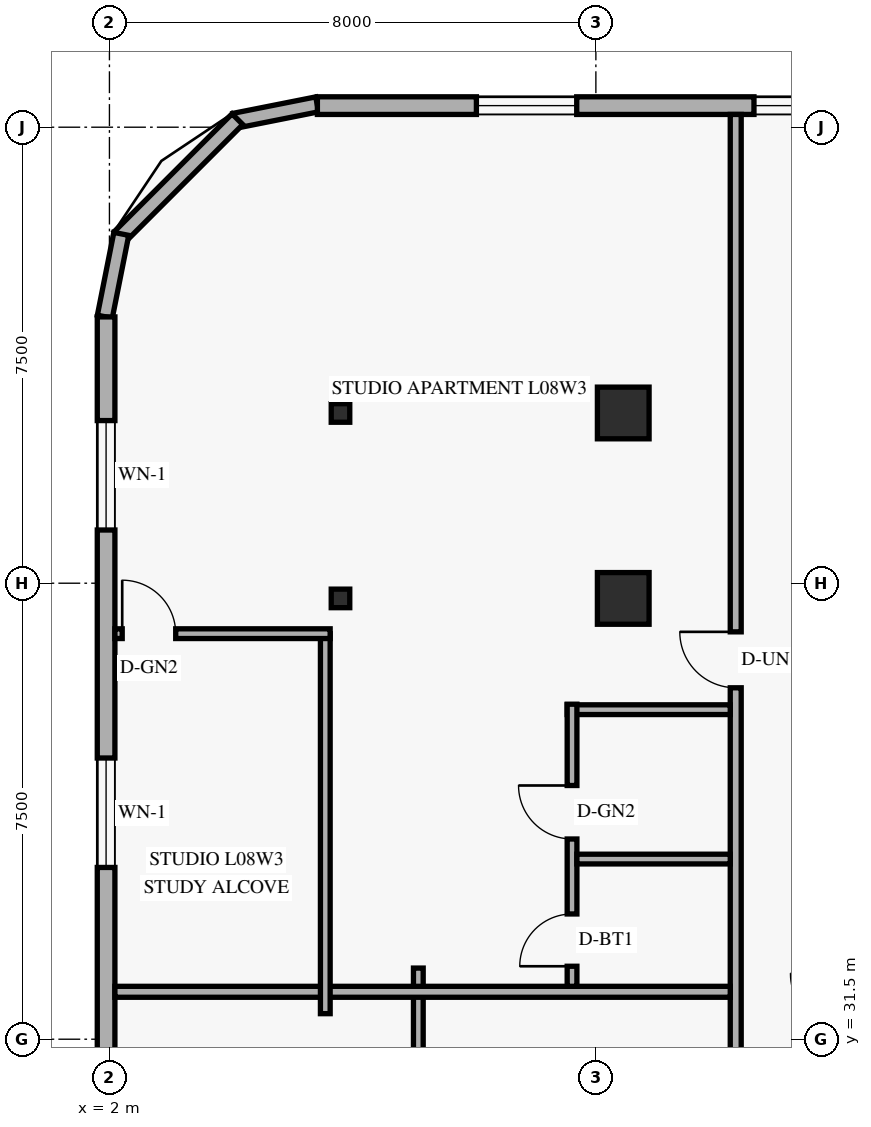
"""IFC4 building model, lengths in metres.
Left out: names, types, materials, properties, quantities, classifications, styles, units other than length and angle.
Written with IfcOpenShell. Run it as: python <this file> out.ifc"""

import sys

from ifc_helpers import new_model, si_unit, direction, frame, frame_2d, origin, origin_2d, place, context, subcontext, project, spatial, rectangle, hollow_rectangle, extrude, element, fill, save


model = new_model("IFC4")
c1 = context("Model", 3, precision=1e-05, world=origin(), true_north=direction((0.0, 1.0)))
c2 = subcontext(c1, "Body", "Model", "MODEL_VIEW")
j1 = project(units=[si_unit("LENGTHUNIT", "METRE"), si_unit("PLANEANGLEUNIT", "RADIAN")], contexts=[c1])
p1 = place(None, origin())
s1 = spatial("IfcSite", under=j1, at=p1, CompositionType="ELEMENT")
p2 = place(p1, origin())
s2 = spatial("IfcBuilding", under=s1, at=p2, CompositionType="ELEMENT")
p3 = place(p2, frame((0.0, 0.0, 34.8)))
s3 = spatial("IfcBuildingStorey", under=s2, at=p3, CompositionType="ELEMENT", Elevation=34.8)
for number, where, z_axis, x_axis in (
    (1, (5.8, 38.75, 0.0), (0.0, 0.0, 1.0), (1.0, 0.0, 0.0)),
    (2, (5.8, 41.8, 0.0), (0.0, 0.0, 1.0), (1.0, 0.0, 0.0)),
):
    element("IfcColumn", number, at=place(p3, frame(where, z_axis=z_axis, x_axis=x_axis)), inside=s3, PredefinedType="COLUMN", context=c2, shape_type="SweptSolid", body=[
        extrude(hollow_rectangle(XDim=0.305, YDim=0.305, WallThickness=0.013, at=origin_2d()), origin(), (0.0, 0.0, 1.0), 3.6),
    ])
for number, where, z_axis, x_axis in (
    (3, (10.45, 38.75, 0.0), (0.0, 0.0, 1.0), (1.0, 0.0, 0.0)),
    (4, (10.45, 41.8, 0.0), (0.0, 0.0, 1.0), (1.0, 0.0, 0.0)),
):
    element("IfcColumn", number, at=place(p3, frame(where, z_axis=z_axis, x_axis=x_axis)), inside=s3, PredefinedType="COLUMN", context=c2, shape_type="SweptSolid", body=[
        extrude(rectangle(XDim=0.85, YDim=0.85, at=origin_2d()), origin(), (0.0, 0.0, 1.0), 3.6),
    ])
p4 = place(p3, frame((5.417, 46.876, 0.0), z_axis=(0.0, 0.0, 1.0), x_axis=(-0.980809899341, -0.19496651342, 0.0)))
e5 = element("IfcWall", 5, at=p4, inside=s3, PredefinedType="SOLIDWALL", context=c2, shape_type="SweptSolid", body=[
    extrude(rectangle(XDim=1.389, YDim=0.25, at=frame_2d((0.694, 0.0))), origin(), (0.0, 0.0, 1.0), 3.36),
])
p5 = place(p3, frame((4.105, 46.632, 0.0), z_axis=(0.0, 0.0, 1.0), x_axis=(-0.707106781187, -0.707106781187, 0.0)))
e6 = element("IfcWall", 6, at=p5, inside=s3, PredefinedType="SOLIDWALL", context=c2, shape_type="SweptSolid", body=[
    extrude(rectangle(XDim=2.739, YDim=0.25, at=frame_2d((1.37, 0.0))), origin(), (0.0, 0.0, 1.0), 3.36),
])
p6 = place(p3, frame((2.195, 44.746, 0.0), z_axis=(0.0, 0.0, 1.0), x_axis=(-0.19496651342, -0.980809899341, 0.0)))
e7 = element("IfcWall", 7, at=p6, inside=s3, PredefinedType="SOLIDWALL", context=c2, shape_type="SweptSolid", body=[
    extrude(rectangle(XDim=1.389, YDim=0.25, at=frame_2d((0.694, 0.0))), origin(), (0.0, 0.0, 1.0), 3.36),
])
p7 = place(p3, frame((44.98, 46.855, 0.0), z_axis=(0.0, 0.0, 1.0), x_axis=(-1.0, 0.0, 0.0)))
e8 = element("IfcWall", 8, at=p7, inside=s3, PredefinedType="SOLIDWALL", context=c2, shape_type="SweptSolid", body=[
    extrude(rectangle(XDim=39.56, YDim=0.29, at=frame_2d((19.78, 0.0))), origin(), (0.0, 0.0, 1.0), 3.36),
])
p8 = place(p7, frame((35.295, 0.0, 0.85)))
e9 = element("IfcOpeningElement", 9, at=p8, cuts=e8, PredefinedType="OPENING", context=c2, shape_type="SweptSolid", body=[
    extrude(rectangle(XDim=1.65, YDim=1.6, at=frame_2d((0.825, 0.8))), frame((0.0, 0.155, 0.0), z_axis=(0.0, -1.0, 0.0), x_axis=(1.0, 0.0, 0.0)), (0.0, 0.0, 1.0), 0.31),
])
p9 = place(p7, frame((31.18, 0.0, 0.85)))
e10 = element("IfcOpeningElement", 10, at=p9, cuts=e8, PredefinedType="OPENING", context=c2, shape_type="SweptSolid", body=[
    extrude(rectangle(XDim=1.2, YDim=1.5, at=frame_2d((0.6, 0.75))), frame((0.0, 0.155, 0.0), z_axis=(0.0, -1.0, 0.0), x_axis=(1.0, 0.0, 0.0)), (0.0, 0.0, 1.0), 0.31),
])
p10 = place(p7, frame((25.684, 0.0, 0.85)))
e11 = element("IfcOpeningElement", 11, at=p10, cuts=e8, PredefinedType="OPENING", context=c2, shape_type="SweptSolid", body=[
    extrude(rectangle(XDim=1.65, YDim=1.6, at=frame_2d((0.825, 0.8))), frame((0.0, 0.155, 0.0), z_axis=(0.0, -1.0, 0.0), x_axis=(1.0, 0.0, 0.0)), (0.0, 0.0, 1.0), 0.31),
])
p11 = place(p7, frame((18.649, 0.0, 0.85)))
e12 = element("IfcOpeningElement", 12, at=p11, cuts=e8, PredefinedType="OPENING", context=c2, shape_type="SweptSolid", body=[
    extrude(rectangle(XDim=1.65, YDim=1.6, at=frame_2d((0.825, 0.8))), frame((0.0, 0.155, 0.0), z_axis=(0.0, -1.0, 0.0), x_axis=(1.0, 0.0, 0.0)), (0.0, 0.0, 1.0), 0.31),
])
p12 = place(p7, frame((12.359, 0.0, 0.85)))
e13 = element("IfcOpeningElement", 13, at=p12, cuts=e8, PredefinedType="OPENING", context=c2, shape_type="SweptSolid", body=[
    extrude(rectangle(XDim=1.65, YDim=1.6, at=frame_2d((0.825, 0.8))), frame((0.0, 0.155, 0.0), z_axis=(0.0, -1.0, 0.0), x_axis=(1.0, 0.0, 0.0)), (0.0, 0.0, 1.0), 0.31),
])
p13 = place(p7, frame((7.895, 0.0, 0.85)))
e14 = element("IfcOpeningElement", 14, at=p13, cuts=e8, PredefinedType="OPENING", context=c2, shape_type="SweptSolid", body=[
    extrude(rectangle(XDim=1.2, YDim=1.5, at=frame_2d((0.6, 0.75))), frame((0.0, 0.155, 0.0), z_axis=(0.0, -1.0, 0.0), x_axis=(1.0, 0.0, 0.0)), (0.0, 0.0, 1.0), 0.31),
])
p14 = place(p7, frame((5.183, 0.0, 0.85)))
e15 = element("IfcOpeningElement", 15, at=p14, cuts=e8, PredefinedType="OPENING", context=c2, shape_type="SweptSolid", body=[
    extrude(rectangle(XDim=1.65, YDim=1.6, at=frame_2d((0.825, 0.8))), frame((0.0, 0.155, 0.0), z_axis=(0.0, -1.0, 0.0), x_axis=(1.0, 0.0, 0.0)), (0.0, 0.0, 1.0), 0.31),
])
p15 = place(p7, frame((1.468, 0.0, 0.85)))
e16 = element("IfcOpeningElement", 16, at=p15, cuts=e8, PredefinedType="OPENING", context=c2, shape_type="SweptSolid", body=[
    extrude(rectangle(XDim=1.65, YDim=1.6, at=frame_2d((0.825, 0.8))), frame((0.0, 0.155, 0.0), z_axis=(0.0, -1.0, 0.0), x_axis=(1.0, 0.0, 0.0)), (0.0, 0.0, 1.0), 0.31),
])
p16 = place(p3, frame((1.945, 43.38, 0.0), z_axis=(0.0, 0.0, 1.0), x_axis=(0.0, -1.0, 0.0)))
e17 = element("IfcWall", 17, at=p16, inside=s3, PredefinedType="SOLIDWALL", context=c2, shape_type="SweptSolid", body=[
    extrude(rectangle(XDim=38.76, YDim=0.29, at=frame_2d((19.38, 0.0))), origin(), (0.0, 0.0, 1.0), 3.36),
])
p17 = place(p16, frame((33.9, 0.0, 0.85)))
e18 = element("IfcOpeningElement", 18, at=p17, cuts=e17, PredefinedType="OPENING", context=c2, shape_type="SweptSolid", body=[
    extrude(rectangle(XDim=1.8, YDim=1.6, at=frame_2d((0.9, 0.8))), frame((0.0, 0.155, 0.0), z_axis=(0.0, -1.0, 0.0), x_axis=(1.0, 0.0, 0.0)), (0.0, 0.0, 1.0), 0.31),
])
p18 = place(p16, frame((27.89, 0.0, 0.85)))
e19 = element("IfcOpeningElement", 19, at=p18, cuts=e17, PredefinedType="OPENING", context=c2, shape_type="SweptSolid", body=[
    extrude(rectangle(XDim=1.8, YDim=1.6, at=frame_2d((0.9, 0.8))), frame((0.0, 0.155, 0.0), z_axis=(0.0, -1.0, 0.0), x_axis=(1.0, 0.0, 0.0)), (0.0, 0.0, 1.0), 0.31),
])
p19 = place(p16, frame((23.859, 0.0, 0.85)))
e20 = element("IfcOpeningElement", 20, at=p19, cuts=e17, PredefinedType="OPENING", context=c2, shape_type="SweptSolid", body=[
    extrude(rectangle(XDim=1.8, YDim=1.6, at=frame_2d((0.9, 0.8))), frame((0.0, 0.155, 0.0), z_axis=(0.0, -1.0, 0.0), x_axis=(1.0, 0.0, 0.0)), (0.0, 0.0, 1.0), 0.31),
])
p20 = place(p16, frame((18.034, 0.0, 0.85)))
e21 = element("IfcOpeningElement", 21, at=p20, cuts=e17, PredefinedType="OPENING", context=c2, shape_type="SweptSolid", body=[
    extrude(rectangle(XDim=1.8, YDim=1.6, at=frame_2d((0.9, 0.8))), frame((0.0, 0.155, 0.0), z_axis=(0.0, -1.0, 0.0), x_axis=(1.0, 0.0, 0.0)), (0.0, 0.0, 1.0), 0.31),
])
p21 = place(p16, frame((12.195, 0.0, 0.85)))
e22 = element("IfcOpeningElement", 22, at=p21, cuts=e17, PredefinedType="OPENING", context=c2, shape_type="SweptSolid", body=[
    extrude(rectangle(XDim=1.8, YDim=1.6, at=frame_2d((0.9, 0.8))), frame((0.0, 0.155, 0.0), z_axis=(0.0, -1.0, 0.0), x_axis=(1.0, 0.0, 0.0)), (0.0, 0.0, 1.0), 0.31),
])
p22 = place(p16, frame((7.255, 0.0, 0.85)))
e23 = element("IfcOpeningElement", 23, at=p22, cuts=e17, PredefinedType="OPENING", context=c2, shape_type="SweptSolid", body=[
    extrude(rectangle(XDim=1.8, YDim=1.6, at=frame_2d((0.9, 0.8))), frame((0.0, 0.155, 0.0), z_axis=(0.0, -1.0, 0.0), x_axis=(1.0, 0.0, 0.0)), (0.0, 0.0, 1.0), 0.31),
])
p23 = place(p16, frame((1.705, 0.0, 0.85)))
e24 = element("IfcOpeningElement", 24, at=p23, cuts=e17, PredefinedType="OPENING", context=c2, shape_type="SweptSolid", body=[
    extrude(rectangle(XDim=1.8, YDim=1.6, at=frame_2d((0.9, 0.8))), frame((0.0, 0.155, 0.0), z_axis=(0.0, -1.0, 0.0), x_axis=(1.0, 0.0, 0.0)), (0.0, 0.0, 1.0), 0.31),
])
p24 = place(p3, frame((12.3, 1.29, 0.0), z_axis=(0.0, 0.0, 1.0), x_axis=(0.0, 1.0, 0.0)))
e25 = element("IfcWall", 25, at=p24, inside=s3, PredefinedType="STANDARD", context=c2, shape_type="SweptSolid", body=[
    extrude(rectangle(XDim=45.42, YDim=0.18, at=frame_2d((22.71, 0.0))), origin(), (0.0, 0.0, 1.0), 2.649),
])
p25 = place(p24, frame((8.06, 0.0, 0.0)))
e26 = element("IfcOpeningElement", 26, at=p25, cuts=e25, PredefinedType="OPENING", context=c2, shape_type="SweptSolid", body=[
    extrude(rectangle(XDim=0.92, YDim=2.15, at=frame_2d((0.46, 1.075))), frame((0.0, 0.1, 0.0), z_axis=(0.0, -1.0, 0.0), x_axis=(1.0, 0.0, 0.0)), (0.0, 0.0, 1.0), 0.2),
])
p26 = place(p24, frame((21.021, 0.0, 0.0)))
e27 = element("IfcOpeningElement", 27, at=p26, cuts=e25, PredefinedType="OPENING", context=c2, shape_type="SweptSolid", body=[
    extrude(rectangle(XDim=0.92, YDim=2.15, at=frame_2d((0.46, 1.075))), frame((0.0, 0.1, 0.0), z_axis=(0.0, -1.0, 0.0), x_axis=(1.0, 0.0, 0.0)), (0.0, 0.0, 1.0), 0.2),
])
p27 = place(p24, frame((35.99, 0.0, 0.0)))
e28 = element("IfcOpeningElement", 28, at=p27, cuts=e25, PredefinedType="OPENING", context=c2, shape_type="SweptSolid", body=[
    extrude(rectangle(XDim=0.92, YDim=2.15, at=frame_2d((0.46, 1.075))), frame((0.0, 0.1, 0.0), z_axis=(0.0, -1.0, 0.0), x_axis=(1.0, 0.0, 0.0)), (0.0, 0.0, 1.0), 0.2),
])
p28 = place(p3, frame((7.08, 28.21, 0.0), z_axis=(0.0, 0.0, 1.0), x_axis=(0.0, 1.0, 0.0)))
e29 = element("IfcWall", 29, at=p28, inside=s3, PredefinedType="PARTITIONING", context=c2, shape_type="SweptSolid", body=[
    extrude(rectangle(XDim=4.46, YDim=0.16, at=frame_2d((2.23, 0.0))), origin(), (0.0, 0.0, 1.0), 2.649),
])
p29 = place(p3, frame((2.09, 32.28, 0.0), z_axis=(0.0, 0.0, 1.0), x_axis=(1.0, 0.0, 0.0)))
e30 = element("IfcWall", 30, at=p29, inside=s3, PredefinedType="PARTITIONING", context=c2, shape_type="SweptSolid", body=[
    extrude(rectangle(XDim=10.12, YDim=0.18, at=frame_2d((5.06, 0.0))), origin(), (0.0, 0.0, 1.0), 2.649),
])
p30 = place(p3, frame((9.528, 36.92, 0.0), z_axis=(0.0, 0.0, 1.0), x_axis=(1.0, 0.0, 0.0)))
e31 = element("IfcWall", 31, at=p30, inside=s3, PredefinedType="PLUMBINGWALL", context=c2, shape_type="SweptSolid", body=[
    extrude(rectangle(XDim=2.682, YDim=0.16, at=frame_2d((1.341, 0.0))), origin(), (0.0, 0.0, 1.0), 2.649),
])
p31 = place(p3, frame((9.608, 32.37, 0.0), z_axis=(0.0, 0.0, 1.0), x_axis=(0.0, 1.0, 0.0)))
e32 = element("IfcWall", 32, at=p31, inside=s3, PredefinedType="PLUMBINGWALL", context=c2, shape_type="SweptSolid", body=[
    extrude(rectangle(XDim=4.64, YDim=0.16, at=frame_2d((2.32, 0.0))), origin(), (0.0, 0.0, 1.0), 2.932),
])
p32 = place(p31, frame((0.33, 0.0, 0.0)))
e33 = element("IfcOpeningElement", 33, at=p32, cuts=e32, PredefinedType="OPENING", context=c2, shape_type="SweptSolid", body=[
    extrude(rectangle(XDim=0.86, YDim=2.12, at=frame_2d((0.43, 1.06))), frame((0.0, 0.09, 0.0), z_axis=(0.0, -1.0, 0.0), x_axis=(1.0, 0.0, 0.0)), (0.0, 0.0, 1.0), 0.18),
])
p33 = place(p31, frame((2.423, 0.0, 0.0)))
e34 = element("IfcOpeningElement", 34, at=p33, cuts=e32, PredefinedType="OPENING", context=c2, shape_type="SweptSolid", body=[
    extrude(rectangle(XDim=0.88, YDim=2.12, at=frame_2d((0.44, 1.06))), frame((0.0, 0.09, 0.0), z_axis=(0.0, -1.0, 0.0), x_axis=(1.0, 0.0, 0.0)), (0.0, 0.0, 1.0), 0.18),
])
p34 = place(p3, frame((9.688, 34.463, 0.0), z_axis=(0.0, 0.0, 1.0), x_axis=(1.0, 0.0, 0.0)))
e35 = element("IfcWall", 35, at=p34, inside=s3, PredefinedType="PLUMBINGWALL", context=c2, shape_type="SweptSolid", body=[
    extrude(rectangle(XDim=2.522, YDim=0.16, at=frame_2d((1.261, 0.0))), origin(), (0.0, 0.0, 1.0), 2.649),
])
p35 = place(p3, frame((5.55, 31.92, 0.0), z_axis=(0.0, 0.0, 1.0), x_axis=(0.0, 1.0, 0.0)))
e36 = element("IfcWall", 36, at=p35, inside=s3, PredefinedType="PARTITIONING", context=c2, shape_type="SweptSolid", body=[
    extrude(rectangle(XDim=6.25, YDim=0.16, at=frame_2d((3.125, 0.0))), origin(), (0.0, 0.0, 1.0), 3.36),
])
p36 = place(p3, frame((2.09, 38.17, 0.0), z_axis=(0.0, 0.0, 1.0), x_axis=(1.0, 0.0, 0.0)))
e37 = element("IfcWall", 37, at=p36, inside=s3, PredefinedType="PARTITIONING", context=c2, shape_type="SweptSolid", body=[
    extrude(rectangle(XDim=3.54, YDim=0.16, at=frame_2d((1.77, 0.0))), origin(), (0.0, 0.0, 1.0), 3.36),
])
p37 = place(p36, frame((0.12, 0.0, 0.0)))
e38 = element("IfcOpeningElement", 38, at=p37, cuts=e37, PredefinedType="OPENING", context=c2, shape_type="SweptSolid", body=[
    extrude(rectangle(XDim=0.88, YDim=2.12, at=frame_2d((0.44, 1.06))), frame((0.0, 0.09, 0.0), z_axis=(0.0, -1.0, 0.0), x_axis=(1.0, 0.0, 0.0)), (0.0, 0.0, 1.0), 0.18),
])
p38 = place(p8, origin())
e39 = element("IfcWindow", 39, at=p38, inside=s3, PartitioningType="SINGLE_PANEL", PredefinedType="WINDOW", context=c2, shape_type="SweptSolid", body=[
    extrude(rectangle(XDim=1.65, YDim=1.6, at=frame_2d((0.825, 0.8))), frame((0.0, 0.03, 0.0), z_axis=(0.0, -1.0, 0.0), x_axis=(1.0, 0.0, 0.0)), (0.0, 0.0, 1.0), 0.06),
])
fill(e9, e39)
p39 = place(p9, origin())
e40 = element("IfcWindow", 40, at=p39, inside=s3, PartitioningType="SINGLE_PANEL", PredefinedType="WINDOW", context=c2, shape_type="SweptSolid", body=[
    extrude(rectangle(XDim=1.2, YDim=1.5, at=frame_2d((0.6, 0.75))), frame((0.0, 0.03, 0.0), z_axis=(0.0, -1.0, 0.0), x_axis=(1.0, 0.0, 0.0)), (0.0, 0.0, 1.0), 0.06),
])
fill(e10, e40)
p40 = place(p22, origin())
e41 = element("IfcWindow", 41, at=p40, inside=s3, PartitioningType="SINGLE_PANEL", PredefinedType="WINDOW", context=c2, shape_type="SweptSolid", body=[
    extrude(rectangle(XDim=1.8, YDim=1.6, at=frame_2d((0.9, 0.8))), frame((0.0, 0.03, 0.0), z_axis=(0.0, -1.0, 0.0), x_axis=(1.0, 0.0, 0.0)), (0.0, 0.0, 1.0), 0.06),
])
fill(e23, e41)
p41 = place(p23, origin())
e42 = element("IfcWindow", 42, at=p41, inside=s3, PartitioningType="SINGLE_PANEL", PredefinedType="WINDOW", context=c2, shape_type="SweptSolid", body=[
    extrude(rectangle(XDim=1.8, YDim=1.6, at=frame_2d((0.9, 0.8))), frame((0.0, 0.03, 0.0), z_axis=(0.0, -1.0, 0.0), x_axis=(1.0, 0.0, 0.0)), (0.0, 0.0, 1.0), 0.06),
])
fill(e24, e42)
p42 = place(p37, origin())
e43 = element("IfcDoor", 43, at=p42, inside=s3, OperationType="SINGLE_SWING_LEFT", PredefinedType="DOOR", context=c2, shape_type="SweptSolid", body=[
    extrude(rectangle(XDim=0.88, YDim=2.12, at=frame_2d((0.44, 1.06))), frame((0.0, 0.025, 0.0), z_axis=(0.0, -1.0, 0.0), x_axis=(1.0, 0.0, 0.0)), (0.0, 0.0, 1.0), 0.05),
])
fill(e38, e43)
p43 = place(p27, origin())
e44 = element("IfcDoor", 44, at=p43, inside=s3, OperationType="SINGLE_SWING_RIGHT", PredefinedType="DOOR", context=c2, shape_type="SweptSolid", body=[
    extrude(rectangle(XDim=0.92, YDim=2.15, at=frame_2d((0.46, 1.075))), frame((0.0, 0.025, 0.0), z_axis=(0.0, -1.0, 0.0), x_axis=(1.0, 0.0, 0.0)), (0.0, 0.0, 1.0), 0.05),
])
fill(e28, e44)
p44 = place(p32, origin())
e45 = element("IfcDoor", 45, at=p44, inside=s3, OperationType="SINGLE_SWING_LEFT", PredefinedType="DOOR", context=c2, shape_type="SweptSolid", body=[
    extrude(rectangle(XDim=0.86, YDim=2.12, at=frame_2d((0.43, 1.06))), frame((0.0, 0.025, 0.0), z_axis=(0.0, -1.0, 0.0), x_axis=(1.0, 0.0, 0.0)), (0.0, 0.0, 1.0), 0.05),
])
fill(e33, e45)
p45 = place(p33, origin())
e46 = element("IfcDoor", 46, at=p45, inside=s3, OperationType="SINGLE_SWING_RIGHT", PredefinedType="DOOR", context=c2, shape_type="SweptSolid", body=[
    extrude(rectangle(XDim=0.88, YDim=2.12, at=frame_2d((0.44, 1.06))), frame((0.0, 0.025, 0.0), z_axis=(0.0, -1.0, 0.0), x_axis=(1.0, 0.0, 0.0)), (0.0, 0.0, 1.0), 0.05),
])
fill(e34, e46)
save(model, sys.argv[1])
